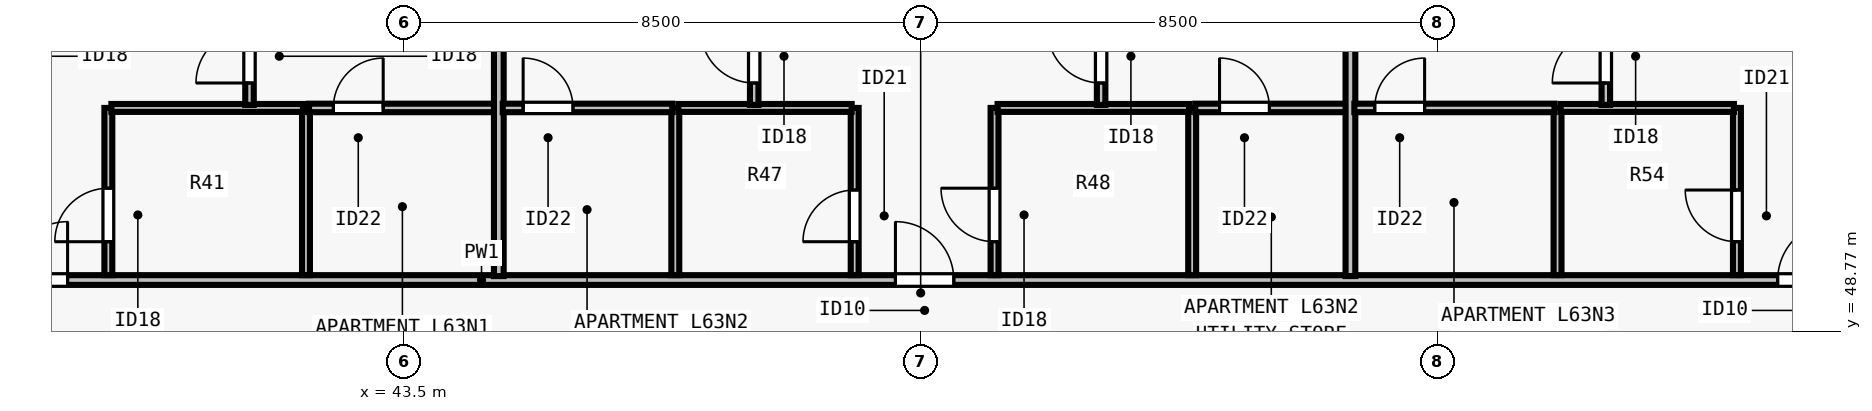
"""IFC4 building model, lengths in metres.
Left out: names, types, materials, properties, quantities, classifications, styles, units other than length and angle.
Written with IfcOpenShell. Run it as: python <this file> out.ifc"""

import sys

from ifc_helpers import new_model, si_unit, direction, frame, frame_2d, origin, place, context, subcontext, project, spatial, rectangle, extrude, element, fill, save


model = new_model("IFC4")
c1 = context("Model", 3, precision=1e-05, world=origin(), true_north=direction((0.0, 1.0)))
c2 = subcontext(c1, "Body", "Model", "MODEL_VIEW")
j1 = project(units=[si_unit("LENGTHUNIT", "METRE"), si_unit("PLANEANGLEUNIT", "RADIAN")], contexts=[c1])
p1 = place(None, origin())
s1 = spatial("IfcSite", under=j1, at=p1, CompositionType="ELEMENT")
p2 = place(p1, origin())
s2 = spatial("IfcBuilding", under=s1, at=p2, CompositionType="ELEMENT")
p3 = place(p2, frame((0.0, 0.0, 230.5)))
s3 = spatial("IfcBuildingStorey", under=s2, at=p3, CompositionType="ELEMENT", Elevation=230.5)
p4 = place(p3, frame((29.77, 49.613, 0.0), z_axis=(0.0, 0.0, 1.0), x_axis=(1.0, 0.0, 0.0)))
e1 = element("IfcWall", 1, at=p4, inside=s3, PredefinedType="PARTITIONING", context=c2, shape_type="SweptSolid", body=[
    extrude(rectangle(XDim=44.425, YDim=0.16, at=frame_2d((22.212, 0.0))), origin(), (0.0, 0.0, 1.0), 2.958),
])
p5 = place(p4, frame((7.241, 0.0, 0.0)))
e2 = element("IfcOpeningElement", 2, at=p5, cuts=e1, PredefinedType="OPENING", context=c2, shape_type="SweptSolid", body=[
    extrude(rectangle(XDim=0.96, YDim=2.18, at=frame_2d((0.48, 1.09))), frame((0.0, 0.09, 0.0), z_axis=(0.0, -1.0, 0.0), x_axis=(1.0, 0.0, 0.0)), (0.0, 0.0, 1.0), 0.18),
])
p6 = place(p4, frame((21.815, 0.0, 0.0)))
e3 = element("IfcOpeningElement", 3, at=p6, cuts=e1, PredefinedType="OPENING", context=c2, shape_type="SweptSolid", body=[
    extrude(rectangle(XDim=0.96, YDim=2.18, at=frame_2d((0.48, 1.09))), frame((0.0, 0.09, 0.0), z_axis=(0.0, -1.0, 0.0), x_axis=(1.0, 0.0, 0.0)), (0.0, 0.0, 1.0), 0.18),
])
p7 = place(p4, frame((36.324, 0.0, 0.0)))
e4 = element("IfcOpeningElement", 4, at=p7, cuts=e1, PredefinedType="OPENING", context=c2, shape_type="SweptSolid", body=[
    extrude(rectangle(XDim=0.96, YDim=2.18, at=frame_2d((0.48, 1.09))), frame((0.0, 0.09, 0.0), z_axis=(0.0, -1.0, 0.0), x_axis=(1.0, 0.0, 0.0)), (0.0, 0.0, 1.0), 0.18),
])
p8 = place(p3, frame((41.891, 49.692, 0.0), z_axis=(0.0, 0.0, 1.0), x_axis=(0.0, 1.0, 0.0)))
e5 = element("IfcWall", 5, at=p8, inside=s3, PredefinedType="PLUMBINGWALL", context=c2, shape_type="SweptSolid", body=[
    extrude(rectangle(XDim=2.75, YDim=0.13, at=frame_2d((1.375, 0.0))), origin(), (0.0, 0.0, 1.0), 2.573),
])
p9 = place(p3, frame((38.641, 49.692, 0.0), z_axis=(0.0, 0.0, 1.0), x_axis=(0.0, 1.0, 0.0)))
e6 = element("IfcWall", 6, at=p9, inside=s3, PredefinedType="PLUMBINGWALL", context=c2, shape_type="SweptSolid", body=[
    extrude(rectangle(XDim=2.75, YDim=0.13, at=frame_2d((1.375, 0.0))), origin(), (0.0, 0.0, 1.0), 3.29),
])
p10 = place(p9, frame((0.55, 0.0, 0.0)))
e7 = element("IfcOpeningElement", 7, at=p10, cuts=e6, PredefinedType="OPENING", context=c2, shape_type="SweptSolid", body=[
    extrude(rectangle(XDim=0.88, YDim=2.1, at=frame_2d((0.44, 1.05))), frame((0.0, 0.075, 0.0), z_axis=(0.0, -1.0, 0.0), x_axis=(1.0, 0.0, 0.0)), (0.0, 0.0, 1.0), 0.15),
])
p11 = place(p3, frame((38.691, 52.442, 0.0), z_axis=(0.0, 0.0, 1.0), x_axis=(1.0, 0.0, 0.0)))
e8 = element("IfcWall", 8, at=p11, inside=s3, PredefinedType="PLUMBINGWALL", context=c2, shape_type="SweptSolid", body=[
    extrude(rectangle(XDim=3.15, YDim=0.13, at=frame_2d((1.575, 0.0))), origin(), (0.0, 0.0, 1.0), 3.29),
])
p12 = place(p3, frame((40.962, 52.492, 0.0), z_axis=(0.0, 0.0, 1.0), x_axis=(0.0, 1.0, 0.0)))
e9 = element("IfcWall", 9, at=p12, inside=s3, PredefinedType="PARTITIONING", context=c2, shape_type="SweptSolid", body=[
    extrude(rectangle(XDim=8.628, YDim=0.14, at=frame_2d((4.314, 0.0))), origin(), (0.0, 0.0, 1.0), 3.29),
])
p13 = place(p12, frame((0.36, 0.0, 0.0)))
e10 = element("IfcOpeningElement", 10, at=p13, cuts=e9, PredefinedType="OPENING", context=c2, shape_type="SweptSolid", body=[
    extrude(rectangle(XDim=0.88, YDim=2.1, at=frame_2d((0.44, 1.05))), frame((0.0, 0.08, 0.0), z_axis=(0.0, -1.0, 0.0), x_axis=(1.0, 0.0, 0.0)), (0.0, 0.0, 1.0), 0.16),
])
p14 = place(p3, frame((41.941, 52.442, 0.0), z_axis=(0.0, 0.0, 1.0), x_axis=(1.0, 0.0, 0.0)))
e11 = element("IfcWall", 11, at=p14, inside=s3, PredefinedType="PARTITIONING", context=c2, shape_type="SweptSolid", body=[
    extrude(rectangle(XDim=3.171, YDim=0.14, at=frame_2d((1.586, 0.0))), origin(), (0.0, 0.0, 1.0), 3.29),
])
p15 = place(p14, frame((0.4, 0.0, 0.0)))
e12 = element("IfcOpeningElement", 12, at=p15, cuts=e11, PredefinedType="OPENING", context=c2, shape_type="SweptSolid", body=[
    extrude(rectangle(XDim=0.82, YDim=2.1, at=frame_2d((0.41, 1.05))), frame((0.0, 0.08, 0.0), z_axis=(0.0, -1.0, 0.0), x_axis=(1.0, 0.0, 0.0)), (0.0, 0.0, 1.0), 0.16),
])
p16 = place(p3, frame((45.062, 49.677, 0.0), z_axis=(0.0, 0.0, 1.0), x_axis=(0.0, 1.0, 0.0)))
e13 = element("IfcWall", 13, at=p16, inside=s3, PredefinedType="PARTITIONING", context=c2, shape_type="SweptSolid", body=[
    extrude(rectangle(XDim=11.518, YDim=0.16, at=frame_2d((5.759, 0.0))), origin(), (0.0, 0.0, 1.0), 3.29),
])
p17 = place(p3, frame((47.965, 49.692, 0.0), z_axis=(0.0, 0.0, 1.0), x_axis=(0.0, 1.0, 0.0)))
e14 = element("IfcWall", 14, at=p17, inside=s3, PredefinedType="PLUMBINGWALL", context=c2, shape_type="SweptSolid", body=[
    extrude(rectangle(XDim=2.75, YDim=0.13, at=frame_2d((1.375, 0.0))), origin(), (0.0, 0.0, 1.0), 3.29),
])
p18 = place(p3, frame((50.915, 49.692, 0.0), z_axis=(0.0, 0.0, 1.0), x_axis=(0.0, 1.0, 0.0)))
e15 = element("IfcWall", 15, at=p18, inside=s3, PredefinedType="PLUMBINGWALL", context=c2, shape_type="SweptSolid", body=[
    extrude(rectangle(XDim=2.75, YDim=0.13, at=frame_2d((1.375, 0.0))), origin(), (0.0, 0.0, 1.0), 3.29),
])
p19 = place(p18, frame((0.55, 0.0, 0.0)))
e16 = element("IfcOpeningElement", 16, at=p19, cuts=e15, PredefinedType="OPENING", context=c2, shape_type="SweptSolid", body=[
    extrude(rectangle(XDim=0.85, YDim=2.08, at=frame_2d((0.425, 1.04))), frame((0.0, 0.075, 0.0), z_axis=(0.0, -1.0, 0.0), x_axis=(1.0, 0.0, 0.0)), (0.0, 0.0, 1.0), 0.15),
])
p20 = place(p3, frame((48.015, 52.442, 0.0), z_axis=(0.0, 0.0, 1.0), x_axis=(1.0, 0.0, 0.0)))
e17 = element("IfcWall", 17, at=p20, inside=s3, PredefinedType="PLUMBINGWALL", context=c2, shape_type="SweptSolid", body=[
    extrude(rectangle(XDim=2.85, YDim=0.13, at=frame_2d((1.425, 0.0))), origin(), (0.0, 0.0, 1.0), 3.29),
])
p21 = place(p3, frame((56.465, 49.692, 0.0), z_axis=(0.0, 0.0, 1.0), x_axis=(0.0, 1.0, 0.0)))
e18 = element("IfcWall", 18, at=p21, inside=s3, PredefinedType="PLUMBINGWALL", context=c2, shape_type="SweptSolid", body=[
    extrude(rectangle(XDim=2.75, YDim=0.13, at=frame_2d((1.375, 0.0))), origin(), (0.0, 0.0, 1.0), 3.29),
])
p22 = place(p3, frame((53.215, 49.692, 0.0), z_axis=(0.0, 0.0, 1.0), x_axis=(0.0, 1.0, 0.0)))
e19 = element("IfcWall", 19, at=p22, inside=s3, PredefinedType="PLUMBINGWALL", context=c2, shape_type="SweptSolid", body=[
    extrude(rectangle(XDim=2.75, YDim=0.13, at=frame_2d((1.375, 0.0))), origin(), (0.0, 0.0, 1.0), 3.29),
])
p23 = place(p22, frame((0.55, 0.0, 0.0)))
e20 = element("IfcOpeningElement", 20, at=p23, cuts=e19, PredefinedType="OPENING", context=c2, shape_type="SweptSolid", body=[
    extrude(rectangle(XDim=0.88, YDim=2.1, at=frame_2d((0.44, 1.05))), frame((0.0, 0.075, 0.0), z_axis=(0.0, -1.0, 0.0), x_axis=(1.0, 0.0, 0.0)), (0.0, 0.0, 1.0), 0.15),
])
p24 = place(p3, frame((53.265, 52.442, 0.0), z_axis=(0.0, 0.0, 1.0), x_axis=(1.0, 0.0, 0.0)))
e21 = element("IfcWall", 21, at=p24, inside=s3, PredefinedType="PLUMBINGWALL", context=c2, shape_type="SweptSolid", body=[
    extrude(rectangle(XDim=3.15, YDim=0.13, at=frame_2d((1.575, 0.0))), origin(), (0.0, 0.0, 1.0), 3.29),
])
p25 = place(p3, frame((49.262, 52.492, 0.0), z_axis=(0.0, 0.0, 1.0), x_axis=(0.0, 1.0, 0.0)))
e22 = element("IfcWall", 22, at=p25, inside=s3, PredefinedType="PARTITIONING", context=c2, shape_type="SweptSolid", body=[
    extrude(rectangle(XDim=8.628, YDim=0.14, at=frame_2d((4.314, 0.0))), origin(), (0.0, 0.0, 1.0), 3.29),
])
p26 = place(p25, frame((0.36, 0.0, 0.0)))
e23 = element("IfcOpeningElement", 23, at=p26, cuts=e22, PredefinedType="OPENING", context=c2, shape_type="SweptSolid", body=[
    extrude(rectangle(XDim=0.88, YDim=2.1, at=frame_2d((0.44, 1.05))), frame((0.0, 0.08, 0.0), z_axis=(0.0, -1.0, 0.0), x_axis=(1.0, 0.0, 0.0)), (0.0, 0.0, 1.0), 0.16),
])
p27 = place(p3, frame((45.127, 52.442, 0.0), z_axis=(0.0, 0.0, 1.0), x_axis=(1.0, 0.0, 0.0)))
e24 = element("IfcWall", 24, at=p27, inside=s3, PredefinedType="PARTITIONING", context=c2, shape_type="SweptSolid", body=[
    extrude(rectangle(XDim=2.788, YDim=0.14, at=frame_2d((1.394, 0.0))), origin(), (0.0, 0.0, 1.0), 3.29),
])
p28 = place(p27, frame((0.335, 0.0, 0.0)))
e25 = element("IfcOpeningElement", 25, at=p28, cuts=e24, PredefinedType="OPENING", context=c2, shape_type="SweptSolid", body=[
    extrude(rectangle(XDim=0.82, YDim=2.1, at=frame_2d((0.41, 1.05))), frame((0.0, 0.08, 0.0), z_axis=(0.0, -1.0, 0.0), x_axis=(1.0, 0.0, 0.0)), (0.0, 0.0, 1.0), 0.16),
])
p29 = place(p3, frame((54.968, 52.492, 0.0), z_axis=(0.0, 0.0, 1.0), x_axis=(0.0, 1.0, 0.0)))
e26 = element("IfcWall", 26, at=p29, inside=s3, PredefinedType="PARTITIONING", context=c2, shape_type="SweptSolid", body=[
    extrude(rectangle(XDim=8.628, YDim=0.14, at=frame_2d((4.314, 0.0))), origin(), (0.0, 0.0, 1.0), 2.958),
])
p30 = place(p29, frame((0.36, 0.0, 0.0)))
e27 = element("IfcOpeningElement", 27, at=p30, cuts=e26, PredefinedType="OPENING", context=c2, shape_type="SweptSolid", body=[
    extrude(rectangle(XDim=0.88, YDim=2.1, at=frame_2d((0.44, 1.05))), frame((0.0, 0.08, 0.0), z_axis=(0.0, -1.0, 0.0), x_axis=(1.0, 0.0, 0.0)), (0.0, 0.0, 1.0), 0.16),
])
p31 = place(p3, frame((56.515, 52.442, 0.0), z_axis=(0.0, 0.0, 1.0), x_axis=(1.0, 0.0, 0.0)))
e28 = element("IfcWall", 28, at=p31, inside=s3, PredefinedType="PARTITIONING", context=c2, shape_type="SweptSolid", body=[
    extrude(rectangle(XDim=2.603, YDim=0.14, at=frame_2d((1.301, 0.0))), origin(), (0.0, 0.0, 1.0), 3.29),
])
p32 = place(p31, frame((0.4, 0.0, 0.0)))
e29 = element("IfcOpeningElement", 29, at=p32, cuts=e28, PredefinedType="OPENING", context=c2, shape_type="SweptSolid", body=[
    extrude(rectangle(XDim=0.82, YDim=2.1, at=frame_2d((0.41, 1.05))), frame((0.0, 0.08, 0.0), z_axis=(0.0, -1.0, 0.0), x_axis=(1.0, 0.0, 0.0)), (0.0, 0.0, 1.0), 0.16),
])
p33 = place(p3, frame((59.067, 49.677, 0.0), z_axis=(0.0, 0.0, 1.0), x_axis=(0.0, 1.0, 0.0)))
e30 = element("IfcWall", 30, at=p33, inside=s3, PredefinedType="PARTITIONING", context=c2, shape_type="SweptSolid", body=[
    extrude(rectangle(XDim=11.518, YDim=0.16, at=frame_2d((5.759, 0.0))), origin(), (0.0, 0.0, 1.0), 3.29),
])
p34 = place(p3, frame((62.474, 49.692, 0.0), z_axis=(0.0, 0.0, 1.0), x_axis=(0.0, 1.0, 0.0)))
e31 = element("IfcWall", 31, at=p34, inside=s3, PredefinedType="PLUMBINGWALL", context=c2, shape_type="SweptSolid", body=[
    extrude(rectangle(XDim=2.75, YDim=0.13, at=frame_2d((1.375, 0.0))), origin(), (0.0, 0.0, 1.0), 2.573),
])
p35 = place(p3, frame((65.424, 49.692, 0.0), z_axis=(0.0, 0.0, 1.0), x_axis=(0.0, 1.0, 0.0)))
e32 = element("IfcWall", 32, at=p35, inside=s3, PredefinedType="PLUMBINGWALL", context=c2, shape_type="SweptSolid", body=[
    extrude(rectangle(XDim=2.75, YDim=0.13, at=frame_2d((1.375, 0.0))), origin(), (0.0, 0.0, 1.0), 3.29),
])
p36 = place(p35, frame((0.55, 0.0, 0.0)))
e33 = element("IfcOpeningElement", 33, at=p36, cuts=e32, PredefinedType="OPENING", context=c2, shape_type="SweptSolid", body=[
    extrude(rectangle(XDim=0.85, YDim=2.08, at=frame_2d((0.425, 1.04))), frame((0.0, 0.075, 0.0), z_axis=(0.0, -1.0, 0.0), x_axis=(1.0, 0.0, 0.0)), (0.0, 0.0, 1.0), 0.15),
])
p37 = place(p3, frame((62.524, 52.442, 0.0), z_axis=(0.0, 0.0, 1.0), x_axis=(1.0, 0.0, 0.0)))
e34 = element("IfcWall", 34, at=p37, inside=s3, PredefinedType="PLUMBINGWALL", context=c2, shape_type="SweptSolid", body=[
    extrude(rectangle(XDim=2.85, YDim=0.13, at=frame_2d((1.425, 0.0))), origin(), (0.0, 0.0, 1.0), 3.29),
])
p38 = place(p3, frame((63.268, 52.492, 0.0), z_axis=(0.0, 0.0, 1.0), x_axis=(0.0, 1.0, 0.0)))
e35 = element("IfcWall", 35, at=p38, inside=s3, PredefinedType="PARTITIONING", context=c2, shape_type="SweptSolid", body=[
    extrude(rectangle(XDim=8.628, YDim=0.14, at=frame_2d((4.314, 0.0))), origin(), (0.0, 0.0, 1.0), 3.29),
])
p39 = place(p38, frame((0.36, 0.0, 0.0)))
e36 = element("IfcOpeningElement", 36, at=p39, cuts=e35, PredefinedType="OPENING", context=c2, shape_type="SweptSolid", body=[
    extrude(rectangle(XDim=0.88, YDim=2.1, at=frame_2d((0.44, 1.05))), frame((0.0, 0.08, 0.0), z_axis=(0.0, -1.0, 0.0), x_axis=(1.0, 0.0, 0.0)), (0.0, 0.0, 1.0), 0.16),
])
p40 = place(p3, frame((59.133, 52.442, 0.0), z_axis=(0.0, 0.0, 1.0), x_axis=(1.0, 0.0, 0.0)))
e37 = element("IfcWall", 37, at=p40, inside=s3, PredefinedType="PARTITIONING", context=c2, shape_type="SweptSolid", body=[
    extrude(rectangle(XDim=3.291, YDim=0.14, at=frame_2d((1.646, 0.0))), origin(), (0.0, 0.0, 1.0), 3.29),
])
p41 = place(p40, frame((0.335, 0.0, 0.0)))
e38 = element("IfcOpeningElement", 38, at=p41, cuts=e37, PredefinedType="OPENING", context=c2, shape_type="SweptSolid", body=[
    extrude(rectangle(XDim=0.82, YDim=2.1, at=frame_2d((0.41, 1.05))), frame((0.0, 0.08, 0.0), z_axis=(0.0, -1.0, 0.0), x_axis=(1.0, 0.0, 0.0)), (0.0, 0.0, 1.0), 0.16),
])
p42 = place(p10, origin())
e39 = element("IfcDoor", 39, at=p42, inside=s3, OperationType="SINGLE_SWING_LEFT", PredefinedType="DOOR", context=c2, shape_type="SweptSolid", body=[
    extrude(rectangle(XDim=0.88, YDim=2.1, at=frame_2d((0.44, 1.05))), frame((0.0, 0.025, 0.0), z_axis=(0.0, -1.0, 0.0), x_axis=(1.0, 0.0, 0.0)), (0.0, 0.0, 1.0), 0.05),
])
fill(e7, e39)
p43 = place(p15, origin())
e40 = element("IfcDoor", 40, at=p43, inside=s3, OperationType="SINGLE_SWING_RIGHT", PredefinedType="DOOR", context=c2, shape_type="SweptSolid", body=[
    extrude(rectangle(XDim=0.82, YDim=2.1, at=frame_2d((0.41, 1.05))), frame((0.0, 0.025, 0.0), z_axis=(0.0, -1.0, 0.0), x_axis=(1.0, 0.0, 0.0)), (0.0, 0.0, 1.0), 0.05),
])
fill(e12, e40)
p44 = place(p13, origin())
e41 = element("IfcDoor", 41, at=p44, inside=s3, OperationType="SINGLE_SWING_LEFT", PredefinedType="DOOR", context=c2, shape_type="SweptSolid", body=[
    extrude(rectangle(XDim=0.88, YDim=2.1, at=frame_2d((0.44, 1.05))), frame((0.0, 0.025, 0.0), z_axis=(0.0, -1.0, 0.0), x_axis=(1.0, 0.0, 0.0)), (0.0, 0.0, 1.0), 0.05),
])
fill(e10, e41)
p45 = place(p5, origin())
e42 = element("IfcDoor", 42, at=p45, inside=s3, OperationType="SINGLE_SWING_RIGHT", PredefinedType="DOOR", context=c2, shape_type="SweptSolid", body=[
    extrude(rectangle(XDim=0.96, YDim=2.18, at=frame_2d((0.48, 1.09))), frame((0.0, 0.025, 0.0), z_axis=(0.0, -1.0, 0.0), x_axis=(1.0, 0.0, 0.0)), (0.0, 0.0, 1.0), 0.05),
])
fill(e2, e42)
p46 = place(p19, origin())
e43 = element("IfcDoor", 43, at=p46, inside=s3, OperationType="SINGLE_SWING_LEFT", PredefinedType="DOOR", context=c2, shape_type="SweptSolid", body=[
    extrude(rectangle(XDim=0.85, YDim=2.08, at=frame_2d((0.425, 1.04))), frame((0.0, 0.025, 0.0), z_axis=(0.0, -1.0, 0.0), x_axis=(1.0, 0.0, 0.0)), (0.0, 0.0, 1.0), 0.05),
])
fill(e16, e43)
p47 = place(p23, origin())
e44 = element("IfcDoor", 44, at=p47, inside=s3, OperationType="SINGLE_SWING_RIGHT", PredefinedType="DOOR", context=c2, shape_type="SweptSolid", body=[
    extrude(rectangle(XDim=0.88, YDim=2.1, at=frame_2d((0.44, 1.05))), frame((0.0, 0.025, 0.0), z_axis=(0.0, -1.0, 0.0), x_axis=(1.0, 0.0, 0.0)), (0.0, 0.0, 1.0), 0.05),
])
fill(e20, e44)
p48 = place(p28, origin())
e45 = element("IfcDoor", 45, at=p48, inside=s3, OperationType="SINGLE_SWING_LEFT", PredefinedType="DOOR", context=c2, shape_type="SweptSolid", body=[
    extrude(rectangle(XDim=0.82, YDim=2.1, at=frame_2d((0.41, 1.05))), frame((0.0, 0.025, 0.0), z_axis=(0.0, -1.0, 0.0), x_axis=(1.0, 0.0, 0.0)), (0.0, 0.0, 1.0), 0.05),
])
fill(e25, e45)
p49 = place(p26, origin())
e46 = element("IfcDoor", 46, at=p49, inside=s3, OperationType="SINGLE_SWING_RIGHT", PredefinedType="DOOR", context=c2, shape_type="SweptSolid", body=[
    extrude(rectangle(XDim=0.88, YDim=2.1, at=frame_2d((0.44, 1.05))), frame((0.0, 0.025, 0.0), z_axis=(0.0, -1.0, 0.0), x_axis=(1.0, 0.0, 0.0)), (0.0, 0.0, 1.0), 0.05),
])
fill(e23, e46)
p50 = place(p32, origin())
e47 = element("IfcDoor", 47, at=p50, inside=s3, OperationType="SINGLE_SWING_LEFT", PredefinedType="DOOR", context=c2, shape_type="SweptSolid", body=[
    extrude(rectangle(XDim=0.82, YDim=2.1, at=frame_2d((0.41, 1.05))), frame((0.0, 0.025, 0.0), z_axis=(0.0, -1.0, 0.0), x_axis=(1.0, 0.0, 0.0)), (0.0, 0.0, 1.0), 0.05),
])
fill(e29, e47)
p51 = place(p30, origin())
e48 = element("IfcDoor", 48, at=p51, inside=s3, OperationType="SINGLE_SWING_RIGHT", PredefinedType="DOOR", context=c2, shape_type="SweptSolid", body=[
    extrude(rectangle(XDim=0.88, YDim=2.1, at=frame_2d((0.44, 1.05))), frame((0.0, 0.025, 0.0), z_axis=(0.0, -1.0, 0.0), x_axis=(1.0, 0.0, 0.0)), (0.0, 0.0, 1.0), 0.05),
])
fill(e27, e48)
p52 = place(p6, origin())
e49 = element("IfcDoor", 49, at=p52, inside=s3, OperationType="SINGLE_SWING_LEFT", PredefinedType="DOOR", context=c2, shape_type="SweptSolid", body=[
    extrude(rectangle(XDim=0.96, YDim=2.18, at=frame_2d((0.48, 1.09))), frame((0.0, 0.025, 0.0), z_axis=(0.0, -1.0, 0.0), x_axis=(1.0, 0.0, 0.0)), (0.0, 0.0, 1.0), 0.05),
])
fill(e3, e49)
p53 = place(p36, origin())
e50 = element("IfcDoor", 50, at=p53, inside=s3, OperationType="SINGLE_SWING_RIGHT", PredefinedType="DOOR", context=c2, shape_type="SweptSolid", body=[
    extrude(rectangle(XDim=0.85, YDim=2.08, at=frame_2d((0.425, 1.04))), frame((0.0, 0.025, 0.0), z_axis=(0.0, -1.0, 0.0), x_axis=(1.0, 0.0, 0.0)), (0.0, 0.0, 1.0), 0.05),
])
fill(e33, e50)
p54 = place(p41, origin())
e51 = element("IfcDoor", 51, at=p54, inside=s3, OperationType="SINGLE_SWING_RIGHT", PredefinedType="DOOR", context=c2, shape_type="SweptSolid", body=[
    extrude(rectangle(XDim=0.82, YDim=2.1, at=frame_2d((0.41, 1.05))), frame((0.0, 0.025, 0.0), z_axis=(0.0, -1.0, 0.0), x_axis=(1.0, 0.0, 0.0)), (0.0, 0.0, 1.0), 0.05),
])
fill(e38, e51)
p55 = place(p39, origin())
e52 = element("IfcDoor", 52, at=p55, inside=s3, OperationType="SINGLE_SWING_LEFT", PredefinedType="DOOR", context=c2, shape_type="SweptSolid", body=[
    extrude(rectangle(XDim=0.88, YDim=2.1, at=frame_2d((0.44, 1.05))), frame((0.0, 0.025, 0.0), z_axis=(0.0, -1.0, 0.0), x_axis=(1.0, 0.0, 0.0)), (0.0, 0.0, 1.0), 0.05),
])
fill(e36, e52)
p56 = place(p7, origin())
e53 = element("IfcDoor", 53, at=p56, inside=s3, OperationType="SINGLE_SWING_RIGHT", PredefinedType="DOOR", context=c2, shape_type="SweptSolid", body=[
    extrude(rectangle(XDim=0.96, YDim=2.18, at=frame_2d((0.48, 1.09))), frame((0.0, 0.025, 0.0), z_axis=(0.0, -1.0, 0.0), x_axis=(1.0, 0.0, 0.0)), (0.0, 0.0, 1.0), 0.05),
])
fill(e4, e53)
save(model, sys.argv[1])
